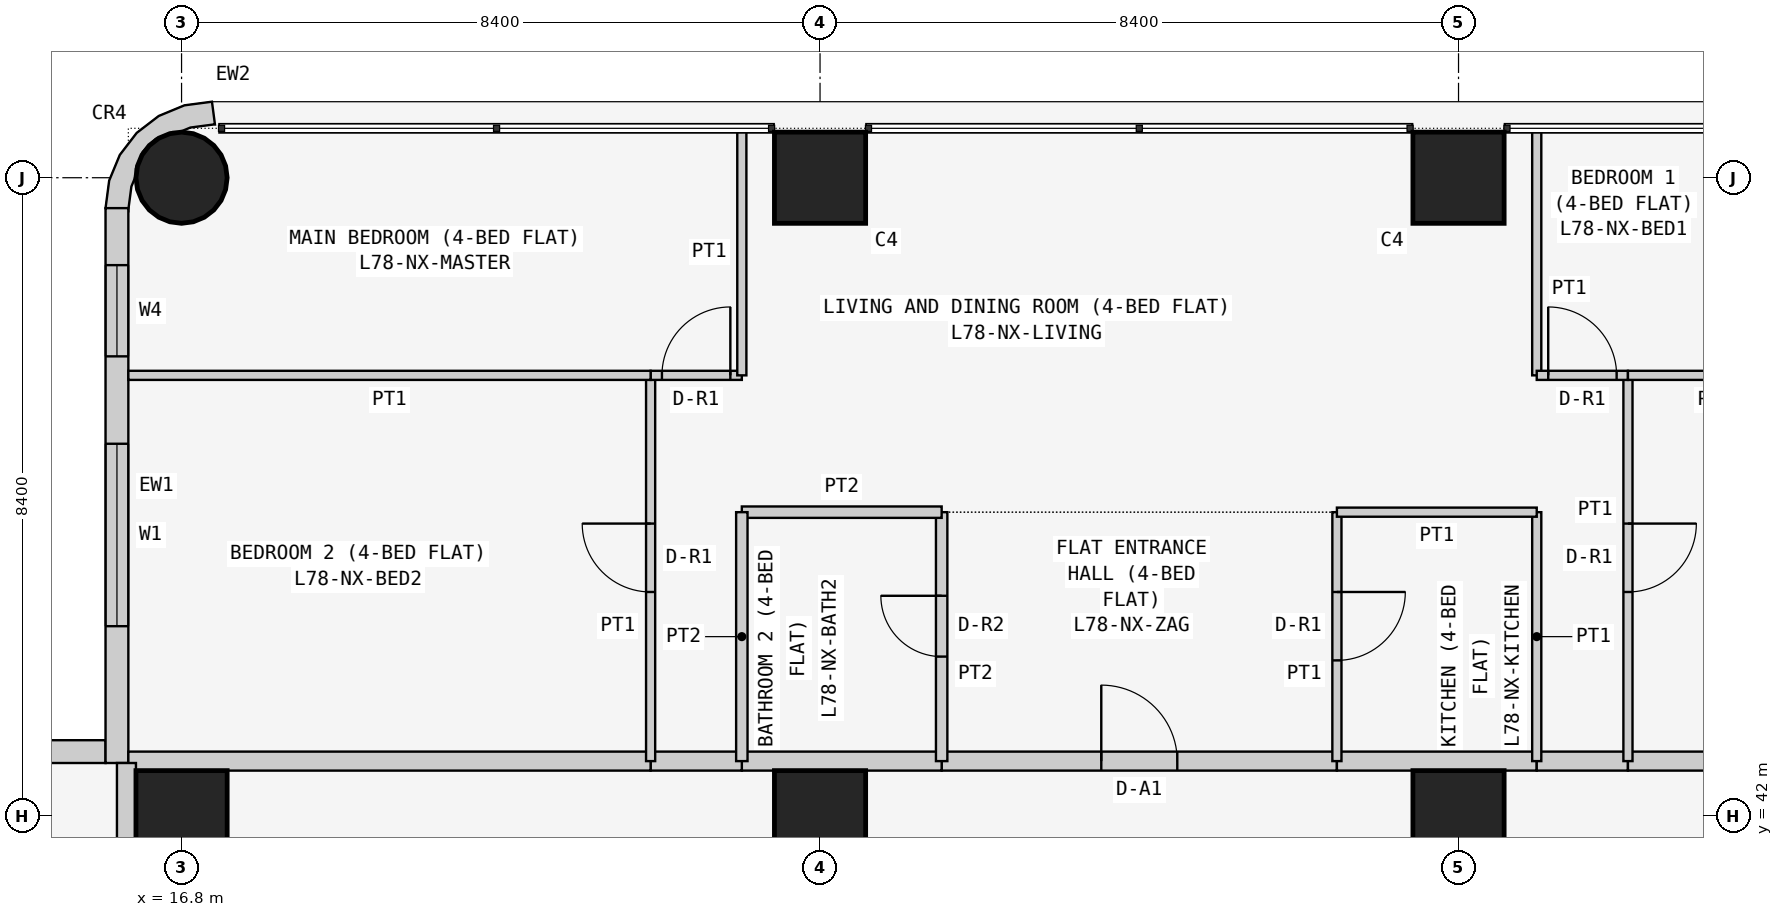
"""IFC4 building model, lengths in metres.
Left out: names, types, materials, properties, quantities, classifications, styles, units other than length and angle.
Written with IfcOpenShell. Run it as: python <this file> out.ifc"""

import sys

from ifc_helpers import new_model, si_unit, direction, frame, frame_2d, origin, origin_2d, place, context, subcontext, project, spatial, polyline, rectangle, circle, outline, extrude, element, fill, save


model = new_model("IFC4")
c1 = context("Model", 3, precision=1e-05, world=origin(), true_north=direction((0.0, 1.0)))
c2 = subcontext(c1, "Body", "Model", "MODEL_VIEW")
j1 = project(units=[si_unit("LENGTHUNIT", "METRE"), si_unit("PLANEANGLEUNIT", "RADIAN")], contexts=[c1])
p1 = place(None, origin())
s1 = spatial("IfcSite", under=j1, at=p1, CompositionType="ELEMENT")
p2 = place(p1, origin())
s2 = spatial("IfcBuilding", under=s1, at=p2, CompositionType="ELEMENT")
p3 = place(p2, frame((0.0, 0.0, 297.3)))
s3 = spatial("IfcBuildingStorey", under=s2, at=p3, CompositionType="ELEMENT", Elevation=297.3)
p4 = place(p3, frame((16.8, 42.0, 0.0), z_axis=(0.0, 0.0, 1.0), x_axis=(1.0, 0.0, 0.0)))
e1 = element("IfcColumn", 1, at=p4, inside=s3, PredefinedType="COLUMN", context=c2, shape_type="SweptSolid", body=[
    extrude(rectangle(XDim=1.2, YDim=1.2, at=origin_2d()), origin(), (0.0, 0.0, 1.0), 3.6),
])
p5 = place(p3, frame((16.8, 50.4, 0.0), z_axis=(0.0, 0.0, 1.0), x_axis=(1.0, 0.0, 0.0)))
e2 = element("IfcColumn", 2, at=p5, inside=s3, PredefinedType="COLUMN", context=c2, shape_type="SweptSolid", body=[
    extrude(circle(Radius=0.6, at=origin_2d()), origin(), (0.0, 0.0, 1.0), 3.6),
])
for number, where, z_axis, x_axis in (
    (3, (25.2, 42.0, 0.0), (0.0, 0.0, 1.0), (1.0, 0.0, 0.0)),
    (4, (25.2, 50.4, 0.0), (0.0, 0.0, 1.0), (1.0, 0.0, 0.0)),
    (5, (33.6, 42.0, 0.0), (0.0, 0.0, 1.0), (1.0, 0.0, 0.0)),
    (6, (33.6, 50.4, 0.0), (0.0, 0.0, 1.0), (1.0, 0.0, 0.0)),
):
    element("IfcColumn", number, at=place(p3, frame(where, z_axis=z_axis, x_axis=x_axis)), inside=s3, PredefinedType="COLUMN", context=c2, shape_type="SweptSolid", body=[
        extrude(rectangle(XDim=1.2, YDim=1.2, at=origin_2d()), origin(), (0.0, 0.0, 1.0), 3.6),
    ])
p6 = place(p3, frame((15.8, 42.85, 0.0), z_axis=(0.0, 0.0, 1.0), x_axis=(-1.0, 0.0, 0.0)))
e7 = element("IfcWall", 7, at=p6, inside=s3, PredefinedType="SOLIDWALL", context=c2, shape_type="SweptSolid", body=[
    extrude(rectangle(XDim=7.0, YDim=0.3, at=frame_2d((3.5, 0.0))), origin(), (0.0, 0.0, 1.0), 3.35),
])
p7 = place(p6, frame((1.5, 0.0, 0.9)))
e8 = element("IfcOpeningElement", 8, at=p7, cuts=e7, PredefinedType="OPENING", context=c2, shape_type="SweptSolid", body=[
    extrude(rectangle(XDim=2.4, YDim=1.5, at=frame_2d((1.2, 0.75))), frame((0.0, 0.16, 0.0), z_axis=(0.0, -1.0, 0.0), x_axis=(1.0, 0.0, 0.0)), (0.0, 0.0, 1.0), 0.32),
])
p8 = place(p6, frame((5.05, 0.0, 0.9)))
e9 = element("IfcOpeningElement", 9, at=p8, cuts=e7, PredefinedType="OPENING", context=c2, shape_type="SweptSolid", body=[
    extrude(rectangle(XDim=1.2, YDim=1.5, at=frame_2d((0.6, 0.75))), frame((0.0, 0.16, 0.0), z_axis=(0.0, -1.0, 0.0), x_axis=(1.0, 0.0, 0.0)), (0.0, 0.0, 1.0), 0.32),
])
p9 = place(p3, frame((15.95, 50.0, 0.0), z_axis=(0.0, 0.0, 1.0), x_axis=(0.0, -1.0, 0.0)))
e10 = element("IfcWall", 10, at=p9, inside=s3, PredefinedType="SOLIDWALL", context=c2, shape_type="SweptSolid", body=[
    extrude(rectangle(XDim=7.3, YDim=0.3, at=frame_2d((3.65, 0.0))), origin(), (0.0, 0.0, 1.0), 3.35),
])
p10 = place(p9, frame((3.1, 0.0, 0.9)))
e11 = element("IfcOpeningElement", 11, at=p10, cuts=e10, PredefinedType="OPENING", context=c2, shape_type="SweptSolid", body=[
    extrude(rectangle(XDim=2.4, YDim=1.5, at=frame_2d((1.2, 0.75))), frame((0.0, 0.16, 0.0), z_axis=(0.0, -1.0, 0.0), x_axis=(1.0, 0.0, 0.0)), (0.0, 0.0, 1.0), 0.32),
])
p11 = place(p9, frame((0.75, 0.0, 0.9)))
e12 = element("IfcOpeningElement", 12, at=p11, cuts=e10, PredefinedType="OPENING", context=c2, shape_type="SweptSolid", body=[
    extrude(rectangle(XDim=1.2, YDim=1.5, at=frame_2d((0.6, 0.75))), frame((0.0, 0.16, 0.0), z_axis=(0.0, -1.0, 0.0), x_axis=(1.0, 0.0, 0.0)), (0.0, 0.0, 1.0), 0.32),
])
p12 = place(p3, frame((17.162, 50.976, 0.0), z_axis=(0.0, 0.0, 1.0), x_axis=(-0.707106781187, 0.707106781187, 0.0)))
e13 = element("IfcWall", 13, at=p12, inside=s3, PredefinedType="SOLIDWALL", context=c2, shape_type="SweptSolid", body=[
    extrude(outline(polyline([(0.047, -0.129), (0.033, -0.143), (0.273, -0.327), (0.495, -0.037), (0.635, 0.301), (0.683, 0.663), (0.635, 1.025), (0.495, 1.363), (0.273, 1.653), (0.033, 1.469), (0.047, 1.455), (0.233, 1.212), (0.292, 1.069), (0.358, 1.003), (0.449, 0.782), (0.449, 0.543), (0.358, 0.322), (0.292, 0.257), (0.233, 0.114), (0.047, -0.129)])), origin(), (0.0, 0.0, 1.0), 3.35),
])
p13 = place(p3, frame((26.8, 42.725, 0.0), z_axis=(0.0, 0.0, 1.0), x_axis=(1.0, 0.0, 0.0)))
e14 = element("IfcWall", 14, at=p13, inside=s3, PredefinedType="PARTITIONING", context=c2, shape_type="SweptSolid", body=[
    extrude(rectangle(XDim=5.2, YDim=0.25, at=frame_2d((2.6, 0.0))), origin(), (0.0, 0.0, 1.0), 3.35),
])
p14 = place(p13, frame((2.1, 0.0, 0.0)))
e15 = element("IfcOpeningElement", 15, at=p14, cuts=e14, PredefinedType="OPENING", context=c2, shape_type="SweptSolid", body=[
    extrude(rectangle(XDim=1.0, YDim=2.1, at=frame_2d((0.5, 1.05))), frame((0.0, 0.135, 0.0), z_axis=(0.0, -1.0, 0.0), x_axis=(1.0, 0.0, 0.0)), (0.0, 0.0, 1.0), 0.27),
])
p15 = place(p3, frame((24.171, 42.725, 0.0), z_axis=(0.0, 0.0, 1.0), x_axis=(1.0, 0.0, 0.0)))
e16 = element("IfcWall", 16, at=p15, inside=s3, PredefinedType="PARTITIONING", context=c2, shape_type="SweptSolid", body=[
    extrude(rectangle(XDim=2.629, YDim=0.25, at=frame_2d((1.314, 0.0))), origin(), (0.0, 0.0, 1.0), 3.35),
])
p16 = place(p3, frame((32.0, 42.725, 0.0), z_axis=(0.0, 0.0, 1.0), x_axis=(1.0, 0.0, 0.0)))
e17 = element("IfcWall", 17, at=p16, inside=s3, PredefinedType="PARTITIONING", context=c2, shape_type="SweptSolid", body=[
    extrude(rectangle(XDim=2.629, YDim=0.25, at=frame_2d((1.314, 0.0))), origin(), (0.0, 0.0, 1.0), 3.35),
])
p17 = place(p3, frame((22.971, 42.725, 0.0), z_axis=(0.0, 0.0, 1.0), x_axis=(1.0, 0.0, 0.0)))
e18 = element("IfcWall", 18, at=p17, inside=s3, PredefinedType="PARTITIONING", context=c2, shape_type="SweptSolid", body=[
    extrude(rectangle(XDim=1.2, YDim=0.25, at=frame_2d((0.6, 0.0))), origin(), (0.0, 0.0, 1.0), 3.35),
])
p18 = place(p3, frame((34.629, 42.725, 0.0), z_axis=(0.0, 0.0, 1.0), x_axis=(1.0, 0.0, 0.0)))
e19 = element("IfcWall", 19, at=p18, inside=s3, PredefinedType="PARTITIONING", context=c2, shape_type="SweptSolid", body=[
    extrude(rectangle(XDim=1.2, YDim=0.25, at=frame_2d((0.6, 0.0))), origin(), (0.0, 0.0, 1.0), 3.35),
])
for number, where, z_axis, x_axis in (
    (20, (16.1, 42.725, 0.0), (0.0, 0.0, 1.0), (1.0, 0.0, 0.0)),
    (21, (35.829, 42.725, 0.0), (0.0, 0.0, 1.0), (1.0, 0.0, 0.0)),
):
    element("IfcWall", number, at=place(p3, frame(where, z_axis=z_axis, x_axis=x_axis)), inside=s3, PredefinedType="PARTITIONING", context=c2, shape_type="SweptSolid", body=[
        extrude(rectangle(XDim=6.871, YDim=0.25, at=frame_2d((3.436, 0.0))), origin(), (0.0, 0.0, 1.0), 3.35),
    ])
p19 = place(p3, frame((16.075, 36.229, 0.0), z_axis=(0.0, 0.0, 1.0), x_axis=(0.0, 1.0, 0.0)))
e22 = element("IfcWall", 22, at=p19, inside=s3, PredefinedType="PARTITIONING", context=c2, shape_type="SweptSolid", body=[
    extrude(rectangle(XDim=6.471, YDim=0.25, at=frame_2d((3.235, 0.0))), origin(), (0.0, 0.0, 1.0), 3.35),
])
p20 = place(p3, frame((26.8, 46.0, 0.0), z_axis=(0.0, 0.0, 1.0), x_axis=(0.0, -1.0, 0.0)))
e23 = element("IfcWall", 23, at=p20, inside=s3, PredefinedType="PARTITIONING", context=c2, shape_type="SweptSolid", body=[
    extrude(rectangle(XDim=3.275, YDim=0.15, at=frame_2d((1.637, 0.0))), origin(), (0.0, 0.0, 1.0), 3.35),
])
p21 = place(p20, frame((1.1, 0.0, 0.0)))
e24 = element("IfcOpeningElement", 24, at=p21, cuts=e23, PredefinedType="OPENING", context=c2, shape_type="SweptSolid", body=[
    extrude(rectangle(XDim=0.8, YDim=2.1, at=frame_2d((0.4, 1.05))), frame((0.0, 0.085, 0.0), z_axis=(0.0, -1.0, 0.0), x_axis=(1.0, 0.0, 0.0)), (0.0, 0.0, 1.0), 0.17),
])
p22 = place(p3, frame((32.0, 42.725, 0.0), z_axis=(0.0, 0.0, 1.0), x_axis=(0.0, 1.0, 0.0)))
e25 = element("IfcWall", 25, at=p22, inside=s3, PredefinedType="PARTITIONING", context=c2, shape_type="SweptSolid", body=[
    extrude(rectangle(XDim=3.275, YDim=0.12, at=frame_2d((1.637, 0.0))), origin(), (0.0, 0.0, 1.0), 3.35),
])
p23 = place(p22, frame((1.325, 0.0, 0.0)))
e26 = element("IfcOpeningElement", 26, at=p23, cuts=e25, PredefinedType="OPENING", context=c2, shape_type="SweptSolid", body=[
    extrude(rectangle(XDim=0.9, YDim=2.1, at=frame_2d((0.45, 1.05))), frame((0.0, 0.07, 0.0), z_axis=(0.0, -1.0, 0.0), x_axis=(1.0, 0.0, 0.0)), (0.0, 0.0, 1.0), 0.14),
])
p24 = place(p3, frame((26.8, 46.0, 0.0), z_axis=(0.0, 0.0, 1.0), x_axis=(-1.0, 0.0, 0.0)))
e27 = element("IfcWall", 27, at=p24, inside=s3, PredefinedType="PARTITIONING", context=c2, shape_type="SweptSolid", body=[
    extrude(rectangle(XDim=2.629, YDim=0.15, at=frame_2d((1.314, 0.0))), origin(), (0.0, 0.0, 1.0), 3.35),
])
p25 = place(p3, frame((24.171, 46.0, 0.0), z_axis=(0.0, 0.0, 1.0), x_axis=(0.0, -1.0, 0.0)))
e28 = element("IfcWall", 28, at=p25, inside=s3, PredefinedType="PARTITIONING", context=c2, shape_type="SweptSolid", body=[
    extrude(rectangle(XDim=3.275, YDim=0.15, at=frame_2d((1.637, 0.0))), origin(), (0.0, 0.0, 1.0), 3.35),
])
p26 = place(p3, frame((34.629, 42.725, 0.0), z_axis=(0.0, 0.0, 1.0), x_axis=(0.0, 1.0, 0.0)))
e29 = element("IfcWall", 29, at=p26, inside=s3, PredefinedType="PARTITIONING", context=c2, shape_type="SweptSolid", body=[
    extrude(rectangle(XDim=3.275, YDim=0.12, at=frame_2d((1.637, 0.0))), origin(), (0.0, 0.0, 1.0), 3.35),
])
p27 = place(p3, frame((34.629, 46.0, 0.0), z_axis=(0.0, 0.0, 1.0), x_axis=(-1.0, 0.0, 0.0)))
e30 = element("IfcWall", 30, at=p27, inside=s3, PredefinedType="PARTITIONING", context=c2, shape_type="SweptSolid", body=[
    extrude(rectangle(XDim=2.629, YDim=0.12, at=frame_2d((1.314, 0.0))), origin(), (0.0, 0.0, 1.0), 3.35),
])
p28 = place(p3, frame((22.971, 42.725, 0.0), z_axis=(0.0, 0.0, 1.0), x_axis=(0.0, 1.0, 0.0)))
e31 = element("IfcWall", 31, at=p28, inside=s3, PredefinedType="PARTITIONING", context=c2, shape_type="SweptSolid", body=[
    extrude(rectangle(XDim=5.075, YDim=0.12, at=frame_2d((2.538, 0.0))), origin(), (0.0, 0.0, 1.0), 3.35),
])
p29 = place(p28, frame((2.225, 0.0, 0.0)))
e32 = element("IfcOpeningElement", 32, at=p29, cuts=e31, PredefinedType="OPENING", context=c2, shape_type="SweptSolid", body=[
    extrude(rectangle(XDim=0.9, YDim=2.1, at=frame_2d((0.45, 1.05))), frame((0.0, 0.07, 0.0), z_axis=(0.0, -1.0, 0.0), x_axis=(1.0, 0.0, 0.0)), (0.0, 0.0, 1.0), 0.14),
])
p30 = place(p3, frame((22.971, 47.8, 0.0), z_axis=(0.0, 0.0, 1.0), x_axis=(1.0, 0.0, 0.0)))
e33 = element("IfcWall", 33, at=p30, inside=s3, PredefinedType="PARTITIONING", context=c2, shape_type="SweptSolid", body=[
    extrude(rectangle(XDim=1.2, YDim=0.12, at=frame_2d((0.6, 0.0))), origin(), (0.0, 0.0, 1.0), 3.35),
])
p31 = place(p30, frame((0.149, 0.0, 0.0)))
e34 = element("IfcOpeningElement", 34, at=p31, cuts=e33, PredefinedType="OPENING", context=c2, shape_type="SweptSolid", body=[
    extrude(rectangle(XDim=0.9, YDim=2.1, at=frame_2d((0.45, 1.05))), frame((0.0, 0.07, 0.0), z_axis=(0.0, -1.0, 0.0), x_axis=(1.0, 0.0, 0.0)), (0.0, 0.0, 1.0), 0.14),
])
p32 = place(p3, frame((24.171, 47.8, 0.0), z_axis=(0.0, 0.0, 1.0), x_axis=(0.0, 1.0, 0.0)))
e35 = element("IfcWall", 35, at=p32, inside=s3, PredefinedType="PARTITIONING", context=c2, shape_type="SweptSolid", body=[
    extrude(rectangle(XDim=3.25, YDim=0.12, at=frame_2d((1.625, 0.0))), origin(), (0.0, 0.0, 1.0), 3.35),
])
p33 = place(p3, frame((35.829, 47.8, 0.0), z_axis=(0.0, 0.0, 1.0), x_axis=(0.0, -1.0, 0.0)))
e36 = element("IfcWall", 36, at=p33, inside=s3, PredefinedType="PARTITIONING", context=c2, shape_type="SweptSolid", body=[
    extrude(rectangle(XDim=5.075, YDim=0.12, at=frame_2d((2.538, 0.0))), origin(), (0.0, 0.0, 1.0), 3.35),
])
p34 = place(p33, frame((1.95, 0.0, 0.0)))
e37 = element("IfcOpeningElement", 37, at=p34, cuts=e36, PredefinedType="OPENING", context=c2, shape_type="SweptSolid", body=[
    extrude(rectangle(XDim=0.9, YDim=2.1, at=frame_2d((0.45, 1.05))), frame((0.0, 0.07, 0.0), z_axis=(0.0, -1.0, 0.0), x_axis=(1.0, 0.0, 0.0)), (0.0, 0.0, 1.0), 0.14),
])
p35 = place(p3, frame((34.629, 51.05, 0.0), z_axis=(0.0, 0.0, 1.0), x_axis=(0.0, -1.0, 0.0)))
e38 = element("IfcWall", 38, at=p35, inside=s3, PredefinedType="PARTITIONING", context=c2, shape_type="SweptSolid", body=[
    extrude(rectangle(XDim=3.25, YDim=0.12, at=frame_2d((1.625, 0.0))), origin(), (0.0, 0.0, 1.0), 3.35),
])
p36 = place(p3, frame((34.629, 47.8, 0.0), z_axis=(0.0, 0.0, 1.0), x_axis=(1.0, 0.0, 0.0)))
e39 = element("IfcWall", 39, at=p36, inside=s3, PredefinedType="PARTITIONING", context=c2, shape_type="SweptSolid", body=[
    extrude(rectangle(XDim=1.2, YDim=0.12, at=frame_2d((0.6, 0.0))), origin(), (0.0, 0.0, 1.0), 3.35),
])
p37 = place(p36, frame((0.151, 0.0, 0.0)))
e40 = element("IfcOpeningElement", 40, at=p37, cuts=e39, PredefinedType="OPENING", context=c2, shape_type="SweptSolid", body=[
    extrude(rectangle(XDim=0.9, YDim=2.1, at=frame_2d((0.45, 1.05))), frame((0.0, 0.07, 0.0), z_axis=(0.0, -1.0, 0.0), x_axis=(1.0, 0.0, 0.0)), (0.0, 0.0, 1.0), 0.14),
])
p38 = place(p3, frame((22.971, 47.8, 0.0), z_axis=(0.0, 0.0, 1.0), x_axis=(-1.0, 0.0, 0.0)))
e41 = element("IfcWall", 41, at=p38, inside=s3, PredefinedType="PARTITIONING", context=c2, shape_type="SweptSolid", body=[
    extrude(rectangle(XDim=6.871, YDim=0.12, at=frame_2d((3.436, 0.0))), origin(), (0.0, 0.0, 1.0), 3.35),
])
p39 = place(p3, frame((38.114, 47.8, 0.0), z_axis=(0.0, 0.0, 1.0), x_axis=(-1.0, 0.0, 0.0)))
e42 = element("IfcWall", 42, at=p39, inside=s3, PredefinedType="PARTITIONING", context=c2, shape_type="SweptSolid", body=[
    extrude(rectangle(XDim=2.285, YDim=0.12, at=frame_2d((1.143, 0.0))), origin(), (0.0, 0.0, 1.0), 3.35),
])
p40 = place(p10, origin())
e43 = element("IfcWindow", 43, at=p40, inside=s3, PartitioningType="SINGLE_PANEL", PredefinedType="WINDOW", context=c2, shape_type="SweptSolid", body=[
    extrude(rectangle(XDim=2.4, YDim=1.5, at=frame_2d((1.2, 0.75))), frame((0.0, 0.03, 0.0), z_axis=(0.0, -1.0, 0.0), x_axis=(1.0, 0.0, 0.0)), (0.0, 0.0, 1.0), 0.06),
])
fill(e11, e43)
p41 = place(p11, origin())
e44 = element("IfcWindow", 44, at=p41, inside=s3, PartitioningType="SINGLE_PANEL", PredefinedType="WINDOW", context=c2, shape_type="SweptSolid", body=[
    extrude(rectangle(XDim=1.2, YDim=1.5, at=frame_2d((0.6, 0.75))), frame((0.0, 0.03, 0.0), z_axis=(0.0, -1.0, 0.0), x_axis=(1.0, 0.0, 0.0)), (0.0, 0.0, 1.0), 0.06),
])
fill(e12, e44)
p42 = place(p14, origin())
e45 = element("IfcDoor", 45, at=p42, inside=s3, OperationType="SINGLE_SWING_LEFT", PredefinedType="DOOR", context=c2, shape_type="SweptSolid", body=[
    extrude(rectangle(XDim=1.0, YDim=2.1, at=frame_2d((0.5, 1.05))), frame((0.0, 0.025, 0.0), z_axis=(0.0, -1.0, 0.0), x_axis=(1.0, 0.0, 0.0)), (0.0, 0.0, 1.0), 0.05),
])
fill(e15, e45)
p43 = place(p21, frame((0.8, 0.0, 0.0), z_axis=(0.0, 0.0, 1.0), x_axis=(-1.0, 0.0, 0.0)))
e46 = element("IfcDoor", 46, at=p43, inside=s3, OperationType="SINGLE_SWING_RIGHT", PredefinedType="DOOR", context=c2, shape_type="SweptSolid", body=[
    extrude(rectangle(XDim=0.8, YDim=2.1, at=frame_2d((0.4, 1.05))), frame((0.0, 0.025, 0.0), z_axis=(0.0, -1.0, 0.0), x_axis=(1.0, 0.0, 0.0)), (0.0, 0.0, 1.0), 0.05),
])
fill(e24, e46)
p44 = place(p23, frame((0.9, 0.0, 0.0), z_axis=(0.0, 0.0, 1.0), x_axis=(-1.0, 0.0, 0.0)))
e47 = element("IfcDoor", 47, at=p44, inside=s3, OperationType="SINGLE_SWING_LEFT", PredefinedType="DOOR", context=c2, shape_type="SweptSolid", body=[
    extrude(rectangle(XDim=0.9, YDim=2.1, at=frame_2d((0.45, 1.05))), frame((0.0, 0.025, 0.0), z_axis=(0.0, -1.0, 0.0), x_axis=(1.0, 0.0, 0.0)), (0.0, 0.0, 1.0), 0.05),
])
fill(e26, e47)
p45 = place(p29, origin())
e48 = element("IfcDoor", 48, at=p45, inside=s3, OperationType="SINGLE_SWING_RIGHT", PredefinedType="DOOR", context=c2, shape_type="SweptSolid", body=[
    extrude(rectangle(XDim=0.9, YDim=2.1, at=frame_2d((0.45, 1.05))), frame((0.0, 0.025, 0.0), z_axis=(0.0, -1.0, 0.0), x_axis=(1.0, 0.0, 0.0)), (0.0, 0.0, 1.0), 0.05),
])
fill(e32, e48)
p46 = place(p31, origin())
e49 = element("IfcDoor", 49, at=p46, inside=s3, OperationType="SINGLE_SWING_RIGHT", PredefinedType="DOOR", context=c2, shape_type="SweptSolid", body=[
    extrude(rectangle(XDim=0.9, YDim=2.1, at=frame_2d((0.45, 1.05))), frame((0.0, 0.025, 0.0), z_axis=(0.0, -1.0, 0.0), x_axis=(1.0, 0.0, 0.0)), (0.0, 0.0, 1.0), 0.05),
])
fill(e34, e49)
p47 = place(p34, origin())
e50 = element("IfcDoor", 50, at=p47, inside=s3, OperationType="SINGLE_SWING_LEFT", PredefinedType="DOOR", context=c2, shape_type="SweptSolid", body=[
    extrude(rectangle(XDim=0.9, YDim=2.1, at=frame_2d((0.45, 1.05))), frame((0.0, 0.025, 0.0), z_axis=(0.0, -1.0, 0.0), x_axis=(1.0, 0.0, 0.0)), (0.0, 0.0, 1.0), 0.05),
])
fill(e37, e50)
p48 = place(p37, origin())
e51 = element("IfcDoor", 51, at=p48, inside=s3, OperationType="SINGLE_SWING_LEFT", PredefinedType="DOOR", context=c2, shape_type="SweptSolid", body=[
    extrude(rectangle(XDim=0.9, YDim=2.1, at=frame_2d((0.45, 1.05))), frame((0.0, 0.025, 0.0), z_axis=(0.0, -1.0, 0.0), x_axis=(1.0, 0.0, 0.0)), (0.0, 0.0, 1.0), 0.05),
])
fill(e40, e51)
save(model, sys.argv[1])
